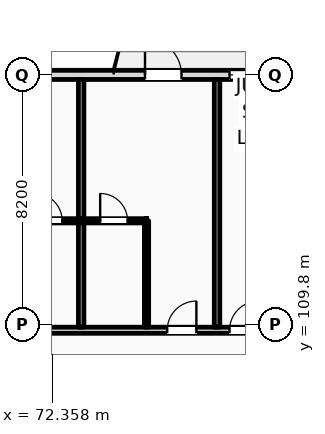
"""IFC4 building model, lengths in metres.
Left out: names, types, materials, properties, quantities, classifications, styles, units other than length and angle.
Written with IfcOpenShell. Run it as: python <this file> out.ifc"""

import sys

from ifc_helpers import new_model, si_unit, direction, frame, frame_2d, origin, place, context, subcontext, project, spatial, rectangle, extrude, element, fill, save


model = new_model("IFC4")
c1 = context("Model", 3, precision=1e-05, world=origin(), true_north=direction((0.0, 1.0)))
c2 = subcontext(c1, "Body", "Model", "MODEL_VIEW")
j1 = project(units=[si_unit("LENGTHUNIT", "METRE"), si_unit("PLANEANGLEUNIT", "RADIAN")], contexts=[c1])
p1 = place(None, origin())
s1 = spatial("IfcSite", under=j1, at=p1, CompositionType="ELEMENT")
p2 = place(p1, origin())
s2 = spatial("IfcBuilding", under=s1, at=p2, CompositionType="ELEMENT")
p3 = place(p2, frame((0.0, 0.0, 24.6)))
s3 = spatial("IfcBuildingStorey", under=s2, at=p3, CompositionType="ELEMENT", Elevation=24.6)
p4 = place(p3, frame((22.5, 118.0, 0.0), z_axis=(0.0, 0.0, 1.0), x_axis=(1.0, 0.0, 0.0)))
e1 = element("IfcWall", 1, at=p4, inside=s3, PredefinedType="STANDARD", context=c2, shape_type="SweptSolid", body=[
    extrude(rectangle(XDim=97.5, YDim=0.3, at=frame_2d((48.75, 0.0))), origin(), (0.0, 0.0, 1.0), 2.78),
])
p5 = place(p4, frame((0.91, 0.0, 0.9)))
e2 = element("IfcOpeningElement", 2, at=p5, cuts=e1, PredefinedType="OPENING", context=c2, shape_type="SweptSolid", body=[
    extrude(rectangle(XDim=0.9, YDim=1.7, at=frame_2d((0.45, 0.85))), frame((0.0, 0.16, 0.0), z_axis=(0.0, -1.0, 0.0), x_axis=(1.0, 0.0, 0.0)), (0.0, 0.0, 1.0), 0.32),
])
p6 = place(p4, frame((6.275, 0.0, 0.0)))
e3 = element("IfcOpeningElement", 3, at=p6, cuts=e1, PredefinedType="OPENING", context=c2, shape_type="SweptSolid", body=[
    extrude(rectangle(XDim=1.2, YDim=2.25, at=frame_2d((0.6, 1.125))), frame((0.0, 0.16, 0.0), z_axis=(0.0, -1.0, 0.0), x_axis=(1.0, 0.0, 0.0)), (0.0, 0.0, 1.0), 0.32),
])
p7 = place(p4, frame((11.42, 0.0, 0.9)))
e4 = element("IfcOpeningElement", 4, at=p7, cuts=e1, PredefinedType="OPENING", context=c2, shape_type="SweptSolid", body=[
    extrude(rectangle(XDim=1.35, YDim=1.7, at=frame_2d((0.675, 0.85))), frame((0.0, 0.16, 0.0), z_axis=(0.0, -1.0, 0.0), x_axis=(1.0, 0.0, 0.0)), (0.0, 0.0, 1.0), 0.32),
])
p8 = place(p4, frame((14.345, 0.0, 0.9)))
e5 = element("IfcOpeningElement", 5, at=p8, cuts=e1, PredefinedType="OPENING", context=c2, shape_type="SweptSolid", body=[
    extrude(rectangle(XDim=1.8, YDim=1.7, at=frame_2d((0.9, 0.85))), frame((0.0, 0.16, 0.0), z_axis=(0.0, -1.0, 0.0), x_axis=(1.0, 0.0, 0.0)), (0.0, 0.0, 1.0), 0.32),
])
p9 = place(p4, frame((19.27, 0.0, 0.9)))
e6 = element("IfcOpeningElement", 6, at=p9, cuts=e1, PredefinedType="OPENING", context=c2, shape_type="SweptSolid", body=[
    extrude(rectangle(XDim=1.95, YDim=1.7, at=frame_2d((0.975, 0.85))), frame((0.0, 0.16, 0.0), z_axis=(0.0, -1.0, 0.0), x_axis=(1.0, 0.0, 0.0)), (0.0, 0.0, 1.0), 0.32),
])
p10 = place(p4, frame((22.97, 0.0, 0.0)))
e7 = element("IfcOpeningElement", 7, at=p10, cuts=e1, PredefinedType="OPENING", context=c2, shape_type="SweptSolid", body=[
    extrude(rectangle(XDim=1.2, YDim=2.25, at=frame_2d((0.6, 1.125))), frame((0.0, 0.16, 0.0), z_axis=(0.0, -1.0, 0.0), x_axis=(1.0, 0.0, 0.0)), (0.0, 0.0, 1.0), 0.32),
])
p11 = place(p4, frame((26.92, 0.0, 0.9)))
e8 = element("IfcOpeningElement", 8, at=p11, cuts=e1, PredefinedType="OPENING", context=c2, shape_type="SweptSolid", body=[
    extrude(rectangle(XDim=2.25, YDim=1.7, at=frame_2d((1.125, 0.85))), frame((0.0, 0.16, 0.0), z_axis=(0.0, -1.0, 0.0), x_axis=(1.0, 0.0, 0.0)), (0.0, 0.0, 1.0), 0.32),
])
p12 = place(p4, frame((30.645, 0.0, 0.9)))
e9 = element("IfcOpeningElement", 9, at=p12, cuts=e1, PredefinedType="OPENING", context=c2, shape_type="SweptSolid", body=[
    extrude(rectangle(XDim=2.4, YDim=1.7, at=frame_2d((1.2, 0.85))), frame((0.0, 0.16, 0.0), z_axis=(0.0, -1.0, 0.0), x_axis=(1.0, 0.0, 0.0)), (0.0, 0.0, 1.0), 0.32),
])
p13 = place(p4, frame((36.71, 0.0, 0.0)))
e10 = element("IfcOpeningElement", 10, at=p13, cuts=e1, PredefinedType="OPENING", context=c2, shape_type="SweptSolid", body=[
    extrude(rectangle(XDim=1.2, YDim=2.25, at=frame_2d((0.6, 1.125))), frame((0.0, 0.16, 0.0), z_axis=(0.0, -1.0, 0.0), x_axis=(1.0, 0.0, 0.0)), (0.0, 0.0, 1.0), 0.32),
])
p14 = place(p4, frame((39.17, 0.0, 0.0)))
e11 = element("IfcOpeningElement", 11, at=p14, cuts=e1, PredefinedType="OPENING", context=c2, shape_type="SweptSolid", body=[
    extrude(rectangle(XDim=1.2, YDim=2.25, at=frame_2d((0.6, 1.125))), frame((0.0, 0.16, 0.0), z_axis=(0.0, -1.0, 0.0), x_axis=(1.0, 0.0, 0.0)), (0.0, 0.0, 1.0), 0.32),
])
p15 = place(p4, frame((43.22, 0.0, 0.9)))
e12 = element("IfcOpeningElement", 12, at=p15, cuts=e1, PredefinedType="OPENING", context=c2, shape_type="SweptSolid", body=[
    extrude(rectangle(XDim=2.85, YDim=1.7, at=frame_2d((1.425, 0.85))), frame((0.0, 0.16, 0.0), z_axis=(0.0, -1.0, 0.0), x_axis=(1.0, 0.0, 0.0)), (0.0, 0.0, 1.0), 0.32),
])
p16 = place(p4, frame((47.29, 0.0, 0.9)))
e13 = element("IfcOpeningElement", 13, at=p16, cuts=e1, PredefinedType="OPENING", context=c2, shape_type="SweptSolid", body=[
    extrude(rectangle(XDim=1.35, YDim=1.7, at=frame_2d((0.675, 0.85))), frame((0.0, 0.16, 0.0), z_axis=(0.0, -1.0, 0.0), x_axis=(1.0, 0.0, 0.0)), (0.0, 0.0, 1.0), 0.32),
])
p17 = place(p4, frame((52.91, 0.0, 0.0)))
e14 = element("IfcOpeningElement", 14, at=p17, cuts=e1, PredefinedType="OPENING", context=c2, shape_type="SweptSolid", body=[
    extrude(rectangle(XDim=1.2, YDim=2.25, at=frame_2d((0.6, 1.125))), frame((0.0, 0.16, 0.0), z_axis=(0.0, -1.0, 0.0), x_axis=(1.0, 0.0, 0.0)), (0.0, 0.0, 1.0), 0.32),
])
p18 = place(p4, frame((55.69, 0.0, 0.9)))
e15 = element("IfcOpeningElement", 15, at=p18, cuts=e1, PredefinedType="OPENING", context=c2, shape_type="SweptSolid", body=[
    extrude(rectangle(XDim=0.9, YDim=1.7, at=frame_2d((0.45, 0.85))), frame((0.0, 0.16, 0.0), z_axis=(0.0, -1.0, 0.0), x_axis=(1.0, 0.0, 0.0)), (0.0, 0.0, 1.0), 0.32),
])
p19 = place(p4, frame((59.82, 0.0, 0.9)))
e16 = element("IfcOpeningElement", 16, at=p19, cuts=e1, PredefinedType="OPENING", context=c2, shape_type="SweptSolid", body=[
    extrude(rectangle(XDim=3.25, YDim=1.7, at=frame_2d((1.625, 0.85))), frame((0.0, 0.16, 0.0), z_axis=(0.0, -1.0, 0.0), x_axis=(1.0, 0.0, 0.0)), (0.0, 0.0, 1.0), 0.32),
])
p20 = place(p4, frame((65.89, 0.0, 0.9)))
e17 = element("IfcOpeningElement", 17, at=p20, cuts=e1, PredefinedType="OPENING", context=c2, shape_type="SweptSolid", body=[
    extrude(rectangle(XDim=1.1, YDim=1.7, at=frame_2d((0.55, 0.85))), frame((0.0, 0.16, 0.0), z_axis=(0.0, -1.0, 0.0), x_axis=(1.0, 0.0, 0.0)), (0.0, 0.0, 1.0), 0.32),
])
p21 = place(p4, frame((69.245, 0.0, 0.0)))
e18 = element("IfcOpeningElement", 18, at=p21, cuts=e1, PredefinedType="OPENING", context=c2, shape_type="SweptSolid", body=[
    extrude(rectangle(XDim=1.2, YDim=2.25, at=frame_2d((0.6, 1.125))), frame((0.0, 0.16, 0.0), z_axis=(0.0, -1.0, 0.0), x_axis=(1.0, 0.0, 0.0)), (0.0, 0.0, 1.0), 0.32),
])
p22 = place(p4, frame((73.69, 0.0, 0.9)))
e19 = element("IfcOpeningElement", 19, at=p22, cuts=e1, PredefinedType="OPENING", context=c2, shape_type="SweptSolid", body=[
    extrude(rectangle(XDim=1.8, YDim=1.7, at=frame_2d((0.9, 0.85))), frame((0.0, 0.16, 0.0), z_axis=(0.0, -1.0, 0.0), x_axis=(1.0, 0.0, 0.0)), (0.0, 0.0, 1.0), 0.32),
])
p23 = place(p4, frame((76.62, 0.0, 0.9)))
e20 = element("IfcOpeningElement", 20, at=p23, cuts=e1, PredefinedType="OPENING", context=c2, shape_type="SweptSolid", body=[
    extrude(rectangle(XDim=3.25, YDim=1.7, at=frame_2d((1.625, 0.85))), frame((0.0, 0.16, 0.0), z_axis=(0.0, -1.0, 0.0), x_axis=(1.0, 0.0, 0.0)), (0.0, 0.0, 1.0), 0.32),
])
p24 = place(p4, frame((81.895, 0.0, 0.9)))
e21 = element("IfcOpeningElement", 21, at=p24, cuts=e1, PredefinedType="OPENING", context=c2, shape_type="SweptSolid", body=[
    extrude(rectangle(XDim=1.1, YDim=1.5, at=frame_2d((0.55, 0.75))), frame((0.0, 0.16, 0.0), z_axis=(0.0, -1.0, 0.0), x_axis=(1.0, 0.0, 0.0)), (0.0, 0.0, 1.0), 0.32),
])
p25 = place(p4, frame((86.02, 0.0, 0.9)))
e22 = element("IfcOpeningElement", 22, at=p25, cuts=e1, PredefinedType="OPENING", context=c2, shape_type="SweptSolid", body=[
    extrude(rectangle(XDim=1.25, YDim=1.6, at=frame_2d((0.625, 0.8))), frame((0.0, 0.16, 0.0), z_axis=(0.0, -1.0, 0.0), x_axis=(1.0, 0.0, 0.0)), (0.0, 0.0, 1.0), 0.32),
])
p26 = place(p4, frame((90.145, 0.0, 0.9)))
e23 = element("IfcOpeningElement", 23, at=p26, cuts=e1, PredefinedType="OPENING", context=c2, shape_type="SweptSolid", body=[
    extrude(rectangle(XDim=1.4, YDim=1.7, at=frame_2d((0.7, 0.85))), frame((0.0, 0.16, 0.0), z_axis=(0.0, -1.0, 0.0), x_axis=(1.0, 0.0, 0.0)), (0.0, 0.0, 1.0), 0.32),
])
p27 = place(p4, frame((94.155, 0.0, 0.9)))
e24 = element("IfcOpeningElement", 24, at=p27, cuts=e1, PredefinedType="OPENING", context=c2, shape_type="SweptSolid", body=[
    extrude(rectangle(XDim=1.6, YDim=1.7, at=frame_2d((0.8, 0.85))), frame((0.0, 0.16, 0.0), z_axis=(0.0, -1.0, 0.0), x_axis=(1.0, 0.0, 0.0)), (0.0, 0.0, 1.0), 0.32),
])
p28 = place(p3, frame((10.65, 109.6, 0.0), z_axis=(0.0, 0.0, 1.0), x_axis=(1.0, 0.0, 0.0)))
e25 = element("IfcWall", 25, at=p28, inside=s3, PredefinedType="PARTITIONING", context=c2, shape_type="SweptSolid", body=[
    extrude(rectangle(XDim=109.21, YDim=0.2, at=frame_2d((54.605, 0.0))), origin(), (0.0, 0.0, 1.0), 2.78),
])
p29 = place(p28, frame((12.705, 0.0, 0.0)))
e26 = element("IfcOpeningElement", 26, at=p29, cuts=e25, PredefinedType="OPENING", context=c2, shape_type="SweptSolid", body=[
    extrude(rectangle(XDim=1.02, YDim=2.2, at=frame_2d((0.51, 1.1))), frame((0.0, 0.11, 0.0), z_axis=(0.0, -1.0, 0.0), x_axis=(1.0, 0.0, 0.0)), (0.0, 0.0, 1.0), 0.22),
])
p30 = place(p28, frame((19.26, 0.0, 0.0)))
e27 = element("IfcOpeningElement", 27, at=p30, cuts=e25, PredefinedType="OPENING", context=c2, shape_type="SweptSolid", body=[
    extrude(rectangle(XDim=1.02, YDim=2.2, at=frame_2d((0.51, 1.1))), frame((0.0, 0.11, 0.0), z_axis=(0.0, -1.0, 0.0), x_axis=(1.0, 0.0, 0.0)), (0.0, 0.0, 1.0), 0.22),
])
p31 = place(p28, frame((23.71, 0.0, 0.0)))
e28 = element("IfcOpeningElement", 28, at=p31, cuts=e25, PredefinedType="OPENING", context=c2, shape_type="SweptSolid", body=[
    extrude(rectangle(XDim=1.02, YDim=2.2, at=frame_2d((0.51, 1.1))), frame((0.0, 0.11, 0.0), z_axis=(0.0, -1.0, 0.0), x_axis=(1.0, 0.0, 0.0)), (0.0, 0.0, 1.0), 0.22),
])
p32 = place(p28, frame((27.66, 0.0, 0.0)))
e29 = element("IfcOpeningElement", 29, at=p32, cuts=e25, PredefinedType="OPENING", context=c2, shape_type="SweptSolid", body=[
    extrude(rectangle(XDim=1.02, YDim=2.2, at=frame_2d((0.51, 1.1))), frame((0.0, 0.11, 0.0), z_axis=(0.0, -1.0, 0.0), x_axis=(1.0, 0.0, 0.0)), (0.0, 0.0, 1.0), 0.22),
])
p33 = place(p28, frame((31.89, 0.0, 0.0)))
e30 = element("IfcOpeningElement", 30, at=p33, cuts=e25, PredefinedType="OPENING", context=c2, shape_type="SweptSolid", body=[
    extrude(rectangle(XDim=0.96, YDim=2.2, at=frame_2d((0.48, 1.1))), frame((0.0, 0.11, 0.0), z_axis=(0.0, -1.0, 0.0), x_axis=(1.0, 0.0, 0.0)), (0.0, 0.0, 1.0), 0.22),
])
p34 = place(p28, frame((33.94, 0.0, 0.0)))
e31 = element("IfcOpeningElement", 31, at=p34, cuts=e25, PredefinedType="OPENING", context=c2, shape_type="SweptSolid", body=[
    extrude(rectangle(XDim=0.96, YDim=2.2, at=frame_2d((0.48, 1.1))), frame((0.0, 0.11, 0.0), z_axis=(0.0, -1.0, 0.0), x_axis=(1.0, 0.0, 0.0)), (0.0, 0.0, 1.0), 0.22),
])
p35 = place(p28, frame((40.29, 0.0, 0.0)))
e32 = element("IfcOpeningElement", 32, at=p35, cuts=e25, PredefinedType="OPENING", context=c2, shape_type="SweptSolid", body=[
    extrude(rectangle(XDim=0.96, YDim=2.2, at=frame_2d((0.48, 1.1))), frame((0.0, 0.11, 0.0), z_axis=(0.0, -1.0, 0.0), x_axis=(1.0, 0.0, 0.0)), (0.0, 0.0, 1.0), 0.22),
])
p36 = place(p28, frame((42.34, 0.0, 0.0)))
e33 = element("IfcOpeningElement", 33, at=p36, cuts=e25, PredefinedType="OPENING", context=c2, shape_type="SweptSolid", body=[
    extrude(rectangle(XDim=0.96, YDim=2.2, at=frame_2d((0.48, 1.1))), frame((0.0, 0.11, 0.0), z_axis=(0.0, -1.0, 0.0), x_axis=(1.0, 0.0, 0.0)), (0.0, 0.0, 1.0), 0.22),
])
p37 = place(p28, frame((48.69, 0.0, 0.0)))
e34 = element("IfcOpeningElement", 34, at=p37, cuts=e25, PredefinedType="OPENING", context=c2, shape_type="SweptSolid", body=[
    extrude(rectangle(XDim=0.96, YDim=2.2, at=frame_2d((0.48, 1.1))), frame((0.0, 0.11, 0.0), z_axis=(0.0, -1.0, 0.0), x_axis=(1.0, 0.0, 0.0)), (0.0, 0.0, 1.0), 0.22),
])
p38 = place(p28, frame((50.74, 0.0, 0.0)))
e35 = element("IfcOpeningElement", 35, at=p38, cuts=e25, PredefinedType="OPENING", context=c2, shape_type="SweptSolid", body=[
    extrude(rectangle(XDim=0.96, YDim=2.2, at=frame_2d((0.48, 1.1))), frame((0.0, 0.11, 0.0), z_axis=(0.0, -1.0, 0.0), x_axis=(1.0, 0.0, 0.0)), (0.0, 0.0, 1.0), 0.22),
])
p39 = place(p28, frame((57.09, 0.0, 0.0)))
e36 = element("IfcOpeningElement", 36, at=p39, cuts=e25, PredefinedType="OPENING", context=c2, shape_type="SweptSolid", body=[
    extrude(rectangle(XDim=0.96, YDim=2.2, at=frame_2d((0.48, 1.1))), frame((0.0, 0.11, 0.0), z_axis=(0.0, -1.0, 0.0), x_axis=(1.0, 0.0, 0.0)), (0.0, 0.0, 1.0), 0.22),
])
p40 = place(p28, frame((59.14, 0.0, 0.0)))
e37 = element("IfcOpeningElement", 37, at=p40, cuts=e25, PredefinedType="OPENING", context=c2, shape_type="SweptSolid", body=[
    extrude(rectangle(XDim=0.96, YDim=2.2, at=frame_2d((0.48, 1.1))), frame((0.0, 0.11, 0.0), z_axis=(0.0, -1.0, 0.0), x_axis=(1.0, 0.0, 0.0)), (0.0, 0.0, 1.0), 0.22),
])
p41 = place(p28, frame((65.49, 0.0, 0.0)))
e38 = element("IfcOpeningElement", 38, at=p41, cuts=e25, PredefinedType="OPENING", context=c2, shape_type="SweptSolid", body=[
    extrude(rectangle(XDim=0.96, YDim=2.2, at=frame_2d((0.48, 1.1))), frame((0.0, 0.11, 0.0), z_axis=(0.0, -1.0, 0.0), x_axis=(1.0, 0.0, 0.0)), (0.0, 0.0, 1.0), 0.22),
])
p42 = place(p28, frame((67.54, 0.0, 0.0)))
e39 = element("IfcOpeningElement", 39, at=p42, cuts=e25, PredefinedType="OPENING", context=c2, shape_type="SweptSolid", body=[
    extrude(rectangle(XDim=0.96, YDim=2.2, at=frame_2d((0.48, 1.1))), frame((0.0, 0.11, 0.0), z_axis=(0.0, -1.0, 0.0), x_axis=(1.0, 0.0, 0.0)), (0.0, 0.0, 1.0), 0.22),
])
p43 = place(p28, frame((73.89, 0.0, 0.0)))
e40 = element("IfcOpeningElement", 40, at=p43, cuts=e25, PredefinedType="OPENING", context=c2, shape_type="SweptSolid", body=[
    extrude(rectangle(XDim=0.96, YDim=2.2, at=frame_2d((0.48, 1.1))), frame((0.0, 0.11, 0.0), z_axis=(0.0, -1.0, 0.0), x_axis=(1.0, 0.0, 0.0)), (0.0, 0.0, 1.0), 0.22),
])
p44 = place(p28, frame((78.09, 0.0, 0.0)))
e41 = element("IfcOpeningElement", 41, at=p44, cuts=e25, PredefinedType="OPENING", context=c2, shape_type="SweptSolid", body=[
    extrude(rectangle(XDim=0.96, YDim=2.2, at=frame_2d((0.48, 1.1))), frame((0.0, 0.11, 0.0), z_axis=(0.0, -1.0, 0.0), x_axis=(1.0, 0.0, 0.0)), (0.0, 0.0, 1.0), 0.22),
])
p45 = place(p28, frame((82.29, 0.0, 0.0)))
e42 = element("IfcOpeningElement", 42, at=p45, cuts=e25, PredefinedType="OPENING", context=c2, shape_type="SweptSolid", body=[
    extrude(rectangle(XDim=0.96, YDim=2.2, at=frame_2d((0.48, 1.1))), frame((0.0, 0.11, 0.0), z_axis=(0.0, -1.0, 0.0), x_axis=(1.0, 0.0, 0.0)), (0.0, 0.0, 1.0), 0.22),
])
p46 = place(p28, frame((86.49, 0.0, 0.0)))
e43 = element("IfcOpeningElement", 43, at=p46, cuts=e25, PredefinedType="OPENING", context=c2, shape_type="SweptSolid", body=[
    extrude(rectangle(XDim=0.96, YDim=2.2, at=frame_2d((0.48, 1.1))), frame((0.0, 0.11, 0.0), z_axis=(0.0, -1.0, 0.0), x_axis=(1.0, 0.0, 0.0)), (0.0, 0.0, 1.0), 0.22),
])
p47 = place(p28, frame((88.54, 0.0, 0.0)))
e44 = element("IfcOpeningElement", 44, at=p47, cuts=e25, PredefinedType="OPENING", context=c2, shape_type="SweptSolid", body=[
    extrude(rectangle(XDim=0.96, YDim=2.2, at=frame_2d((0.48, 1.1))), frame((0.0, 0.11, 0.0), z_axis=(0.0, -1.0, 0.0), x_axis=(1.0, 0.0, 0.0)), (0.0, 0.0, 1.0), 0.22),
])
p48 = place(p28, frame((94.89, 0.0, 0.0)))
e45 = element("IfcOpeningElement", 45, at=p48, cuts=e25, PredefinedType="OPENING", context=c2, shape_type="SweptSolid", body=[
    extrude(rectangle(XDim=0.96, YDim=2.2, at=frame_2d((0.48, 1.1))), frame((0.0, 0.11, 0.0), z_axis=(0.0, -1.0, 0.0), x_axis=(1.0, 0.0, 0.0)), (0.0, 0.0, 1.0), 0.22),
])
p49 = place(p28, frame((96.94, 0.0, 0.0)))
e46 = element("IfcOpeningElement", 46, at=p49, cuts=e25, PredefinedType="OPENING", context=c2, shape_type="SweptSolid", body=[
    extrude(rectangle(XDim=0.96, YDim=2.2, at=frame_2d((0.48, 1.1))), frame((0.0, 0.11, 0.0), z_axis=(0.0, -1.0, 0.0), x_axis=(1.0, 0.0, 0.0)), (0.0, 0.0, 1.0), 0.22),
])
p50 = place(p28, frame((103.29, 0.0, 0.0)))
e47 = element("IfcOpeningElement", 47, at=p50, cuts=e25, PredefinedType="OPENING", context=c2, shape_type="SweptSolid", body=[
    extrude(rectangle(XDim=0.96, YDim=2.2, at=frame_2d((0.48, 1.1))), frame((0.0, 0.11, 0.0), z_axis=(0.0, -1.0, 0.0), x_axis=(1.0, 0.0, 0.0)), (0.0, 0.0, 1.0), 0.22),
])
p51 = place(p28, frame((105.25, 0.0, 0.0)))
e48 = element("IfcOpeningElement", 48, at=p51, cuts=e25, PredefinedType="OPENING", context=c2, shape_type="SweptSolid", body=[
    extrude(rectangle(XDim=0.96, YDim=2.2, at=frame_2d((0.48, 1.1))), frame((0.0, 0.11, 0.0), z_axis=(0.0, -1.0, 0.0), x_axis=(1.0, 0.0, 0.0)), (0.0, 0.0, 1.0), 0.22),
])
p52 = place(p28, frame((2.716, 0.0, 0.0)))
e49 = element("IfcOpeningElement", 49, at=p52, cuts=e25, PredefinedType="OPENING", context=c2, shape_type="SweptSolid", body=[
    extrude(rectangle(XDim=1.35, YDim=2.25, at=frame_2d((0.675, 1.125))), frame((0.0, 0.11, 0.0), z_axis=(0.0, -1.0, 0.0), x_axis=(1.0, 0.0, 0.0)), (0.0, 0.0, 1.0), 0.22),
])
p53 = place(p28, frame((6.65, 0.0, 0.0)))
e50 = element("IfcOpeningElement", 50, at=p53, cuts=e25, PredefinedType="OPENING", context=c2, shape_type="SweptSolid", body=[
    extrude(rectangle(XDim=1.35, YDim=2.25, at=frame_2d((0.675, 1.125))), frame((0.0, 0.11, 0.0), z_axis=(0.0, -1.0, 0.0), x_axis=(1.0, 0.0, 0.0)), (0.0, 0.0, 1.0), 0.22),
])
p54 = place(p28, frame((10.583, 0.0, 0.0)))
e51 = element("IfcOpeningElement", 51, at=p54, cuts=e25, PredefinedType="OPENING", context=c2, shape_type="SweptSolid", body=[
    extrude(rectangle(XDim=1.35, YDim=2.25, at=frame_2d((0.675, 1.125))), frame((0.0, 0.11, 0.0), z_axis=(0.0, -1.0, 0.0), x_axis=(1.0, 0.0, 0.0)), (0.0, 0.0, 1.0), 0.22),
])
p55 = place(p3, frame((73.31, 109.7, 0.0), z_axis=(0.0, 0.0, 1.0), x_axis=(0.0, 1.0, 0.0)))
e52 = element("IfcWall", 52, at=p55, inside=s3, PredefinedType="PARTITIONING", context=c2, shape_type="SweptSolid", body=[
    extrude(rectangle(XDim=8.15, YDim=0.18, at=frame_2d((4.075, 0.0))), origin(), (0.0, 0.0, 1.0), 3.34),
])
p56 = place(p3, frame((71.16, 113.2, 0.0), z_axis=(0.0, 0.0, 1.0), x_axis=(1.0, 0.0, 0.0)))
e53 = element("IfcWall", 53, at=p56, inside=s3, PredefinedType="PARTITIONING", context=c2, shape_type="SweptSolid", body=[
    extrude(rectangle(XDim=2.15, YDim=0.14, at=frame_2d((1.075, 0.0))), origin(), (0.0, 0.0, 1.0), 3.34),
])
p57 = place(p56, frame((0.625, 0.0, 0.0)))
e54 = element("IfcOpeningElement", 54, at=p57, cuts=e53, PredefinedType="OPENING", context=c2, shape_type="SweptSolid", body=[
    extrude(rectangle(XDim=0.9, YDim=2.1, at=frame_2d((0.45, 1.05))), frame((0.0, 0.08, 0.0), z_axis=(0.0, -1.0, 0.0), x_axis=(1.0, 0.0, 0.0)), (0.0, 0.0, 1.0), 0.16),
])
p58 = place(p3, frame((77.78, 109.7, 0.0), z_axis=(0.0, 0.0, 1.0), x_axis=(0.0, 1.0, 0.0)))
e55 = element("IfcWall", 55, at=p58, inside=s3, PredefinedType="PARTITIONING", context=c2, shape_type="SweptSolid", body=[
    extrude(rectangle(XDim=8.15, YDim=0.18, at=frame_2d((4.075, 0.0))), origin(), (0.0, 0.0, 1.0), 3.34),
])
p59 = place(p3, frame((75.46, 109.7, 0.0), z_axis=(0.0, 0.0, 1.0), x_axis=(0.0, 1.0, 0.0)))
e56 = element("IfcWall", 56, at=p59, inside=s3, PredefinedType="PARTITIONING", context=c2, shape_type="SweptSolid", body=[
    extrude(rectangle(XDim=3.5, YDim=0.14, at=frame_2d((1.75, 0.0))), origin(), (0.0, 0.0, 1.0), 3.34),
])
p60 = place(p3, frame((73.31, 113.2, 0.0), z_axis=(0.0, 0.0, 1.0), x_axis=(1.0, 0.0, 0.0)))
e57 = element("IfcWall", 57, at=p60, inside=s3, PredefinedType="PARTITIONING", context=c2, shape_type="SweptSolid", body=[
    extrude(rectangle(XDim=2.15, YDim=0.14, at=frame_2d((1.075, 0.0))), origin(), (0.0, 0.0, 1.0), 3.34),
])
p61 = place(p60, frame((0.625, 0.0, 0.0)))
e58 = element("IfcOpeningElement", 58, at=p61, cuts=e57, PredefinedType="OPENING", context=c2, shape_type="SweptSolid", body=[
    extrude(rectangle(XDim=0.9, YDim=2.1, at=frame_2d((0.45, 1.05))), frame((0.0, 0.08, 0.0), z_axis=(0.0, -1.0, 0.0), x_axis=(1.0, 0.0, 0.0)), (0.0, 0.0, 1.0), 0.16),
])
p62 = place(p17, origin())
e59 = element("IfcDoor", 59, at=p62, inside=s3, OperationType="SINGLE_SWING_LEFT", PredefinedType="DOOR", context=c2, shape_type="SweptSolid", body=[
    extrude(rectangle(XDim=1.2, YDim=2.25, at=frame_2d((0.6, 1.125))), frame((0.0, 0.025, 0.0), z_axis=(0.0, -1.0, 0.0), x_axis=(1.0, 0.0, 0.0)), (0.0, 0.0, 1.0), 0.05),
])
fill(e14, e59)
p63 = place(p18, origin())
e60 = element("IfcWindow", 60, at=p63, inside=s3, PartitioningType="DOUBLE_PANEL_VERTICAL", PredefinedType="WINDOW", context=c2, shape_type="SweptSolid", body=[
    extrude(rectangle(XDim=0.9, YDim=1.7, at=frame_2d((0.45, 0.85))), frame((0.0, 0.03, 0.0), z_axis=(0.0, -1.0, 0.0), x_axis=(1.0, 0.0, 0.0)), (0.0, 0.0, 1.0), 0.06),
])
fill(e15, e60)
p64 = place(p57, origin())
e61 = element("IfcDoor", 61, at=p64, inside=s3, OperationType="SINGLE_SWING_LEFT", PredefinedType="DOOR", context=c2, shape_type="SweptSolid", body=[
    extrude(rectangle(XDim=0.9, YDim=2.1, at=frame_2d((0.45, 1.05))), frame((0.0, 0.025, 0.0), z_axis=(0.0, -1.0, 0.0), x_axis=(1.0, 0.0, 0.0)), (0.0, 0.0, 1.0), 0.05),
])
fill(e54, e61)
p65 = place(p41, origin())
e62 = element("IfcDoor", 62, at=p65, inside=s3, OperationType="SINGLE_SWING_RIGHT", PredefinedType="DOOR", context=c2, shape_type="SweptSolid", body=[
    extrude(rectangle(XDim=0.96, YDim=2.2, at=frame_2d((0.48, 1.1))), frame((0.0, 0.025, 0.0), z_axis=(0.0, -1.0, 0.0), x_axis=(1.0, 0.0, 0.0)), (0.0, 0.0, 1.0), 0.05),
])
fill(e38, e62)
p66 = place(p61, origin())
e63 = element("IfcDoor", 63, at=p66, inside=s3, OperationType="SINGLE_SWING_LEFT", PredefinedType="DOOR", context=c2, shape_type="SweptSolid", body=[
    extrude(rectangle(XDim=0.9, YDim=2.1, at=frame_2d((0.45, 1.05))), frame((0.0, 0.025, 0.0), z_axis=(0.0, -1.0, 0.0), x_axis=(1.0, 0.0, 0.0)), (0.0, 0.0, 1.0), 0.05),
])
fill(e58, e63)
p67 = place(p42, origin())
e64 = element("IfcDoor", 64, at=p67, inside=s3, OperationType="SINGLE_SWING_RIGHT", PredefinedType="DOOR", context=c2, shape_type="SweptSolid", body=[
    extrude(rectangle(XDim=0.96, YDim=2.2, at=frame_2d((0.48, 1.1))), frame((0.0, 0.025, 0.0), z_axis=(0.0, -1.0, 0.0), x_axis=(1.0, 0.0, 0.0)), (0.0, 0.0, 1.0), 0.05),
])
fill(e39, e64)
save(model, sys.argv[1])
